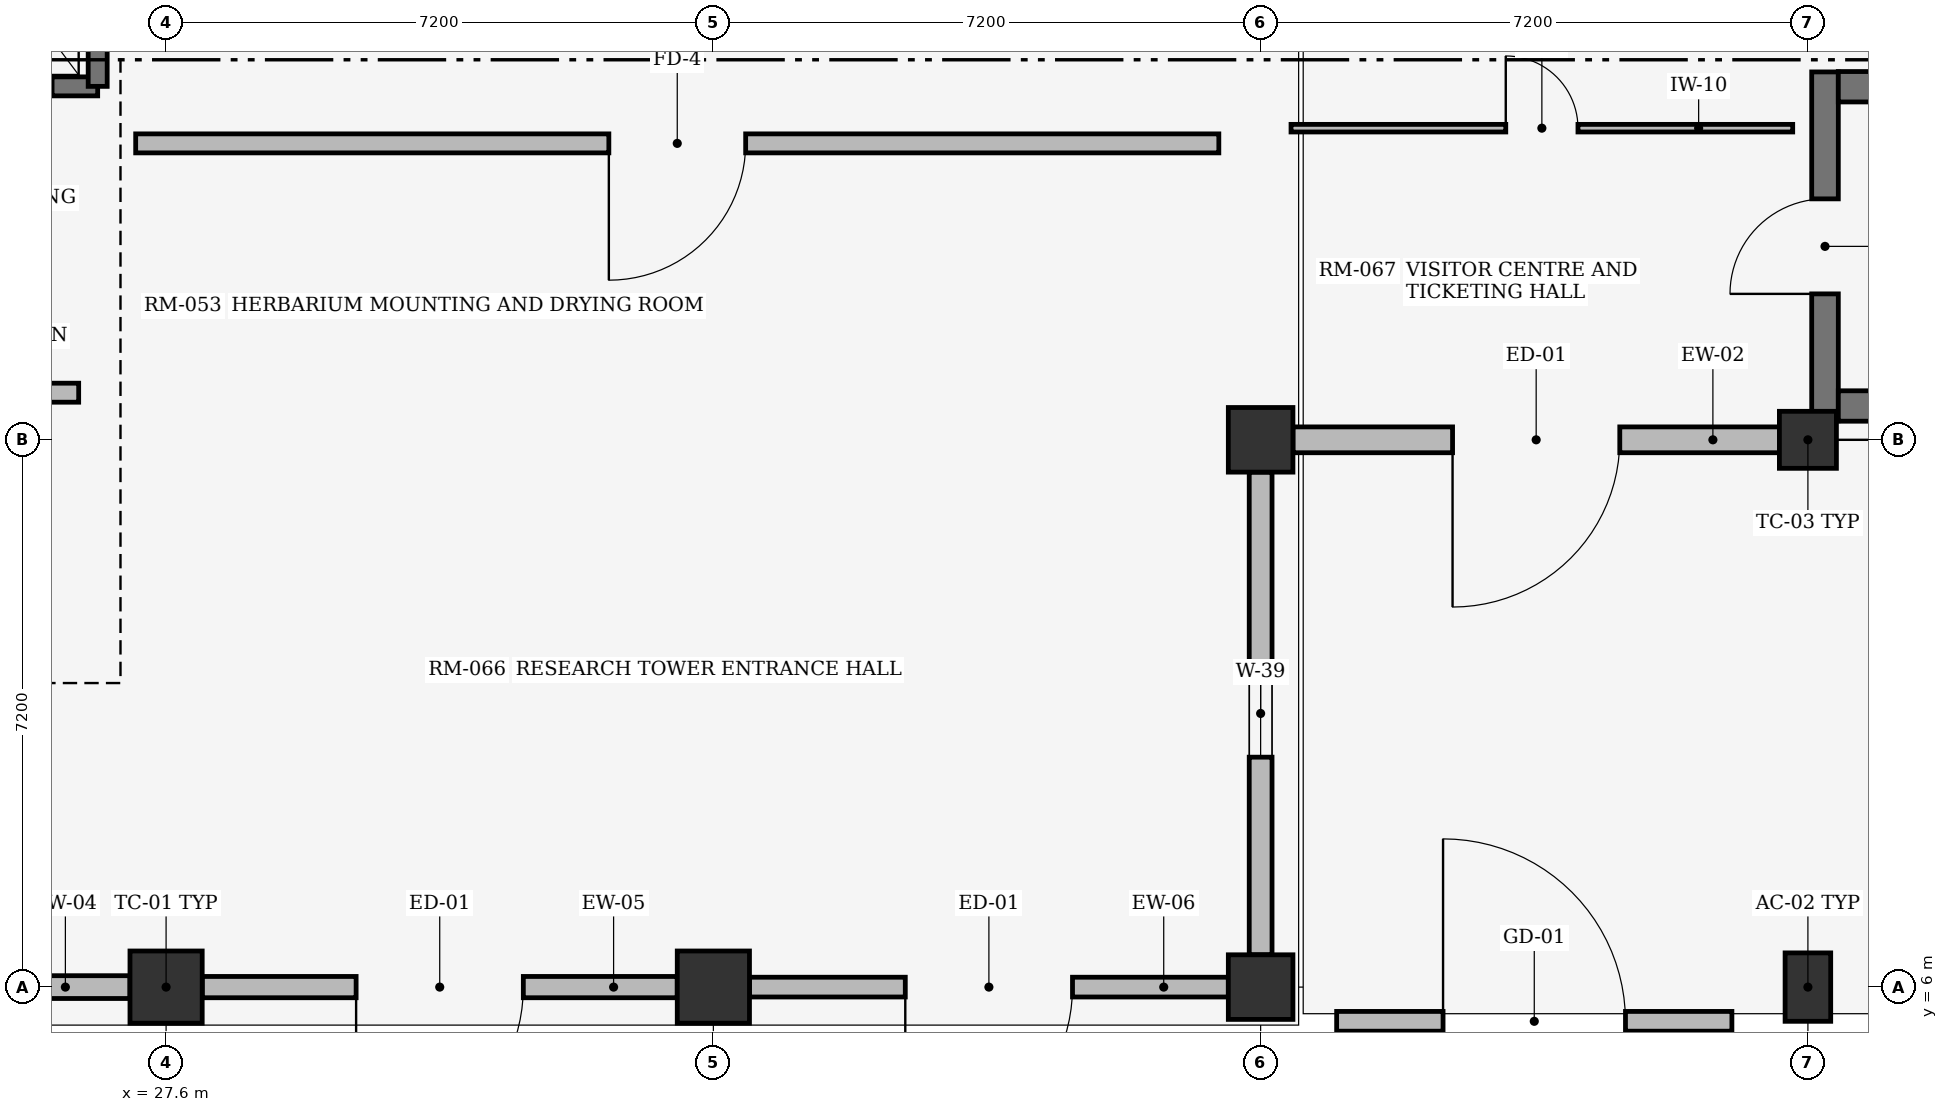
"""IFC4 building model, lengths in metres.
Left out: names, types, materials, properties, quantities, classifications, styles, units other than length and angle.
Written with IfcOpenShell. Run it as: python <this file> out.ifc"""

import sys

from ifc_helpers import new_model, si_unit, direction, frame, frame_2d, origin, origin_2d, place, context, subcontext, project, spatial, rectangle, extrude, element, fill, save


model = new_model("IFC4")
c1 = context("Model", 3, precision=1e-05, world=origin(), true_north=direction((0.0, 1.0)))
c2 = subcontext(c1, "Body", "Model", "MODEL_VIEW")
j1 = project(units=[si_unit("LENGTHUNIT", "METRE"), si_unit("PLANEANGLEUNIT", "RADIAN")], contexts=[c1])
p1 = place(None, origin())
s1 = spatial("IfcSite", under=j1, at=p1, CompositionType="ELEMENT")
p2 = place(p1, origin())
s2 = spatial("IfcBuilding", under=s1, at=p2, CompositionType="ELEMENT")
p3 = place(p2, origin())
s3 = spatial("IfcBuildingStorey", under=s2, at=p3, CompositionType="ELEMENT", Elevation=0.0)
for number, where, z_axis, x_axis in (
    (1, (27.6, 6.0, 0.0), (0.0, 0.0, 1.0), (1.0, 0.0, 0.0)),
    (2, (34.8, 6.0, 0.0), (0.0, 0.0, 1.0), (1.0, 0.0, 0.0)),
):
    element("IfcColumn", number, at=place(p3, frame(where, z_axis=z_axis, x_axis=x_axis)), inside=s3, PredefinedType="COLUMN", context=c2, shape_type="SweptSolid", body=[
        extrude(rectangle(XDim=0.95, YDim=0.95, at=origin_2d()), origin(), (0.0, 0.0, 1.0), 4.48),
    ])
for number, where, z_axis, x_axis in (
    (3, (42.0, 6.0, 0.0), (0.0, 0.0, 1.0), (1.0, 0.0, 0.0)),
    (4, (42.0, 13.2, 0.0), (0.0, 0.0, 1.0), (1.0, 0.0, 0.0)),
):
    element("IfcColumn", number, at=place(p3, frame(where, z_axis=z_axis, x_axis=x_axis)), inside=s3, PredefinedType="COLUMN", context=c2, shape_type="SweptSolid", body=[
        extrude(rectangle(XDim=0.85, YDim=0.85, at=origin_2d()), origin(), (0.0, 0.0, 1.0), 4.48),
    ])
p4 = place(p3, frame((49.2, 6.0, 0.0), z_axis=(0.0, 0.0, 1.0), x_axis=(1.0, 0.0, 0.0)))
e5 = element("IfcColumn", 5, at=p4, inside=s3, PredefinedType="PILASTER", context=c2, shape_type="SweptSolid", body=[
    extrude(rectangle(XDim=0.6, YDim=0.9, at=origin_2d()), origin(), (0.0, 0.0, 1.0), 4.48),
])
p5 = place(p3, frame((49.2, 13.2, 0.0), z_axis=(0.0, 0.0, 1.0), x_axis=(1.0, 0.0, 0.0)))
e6 = element("IfcColumn", 6, at=p5, inside=s3, PredefinedType="COLUMN", context=c2, shape_type="SweptSolid", body=[
    extrude(rectangle(XDim=0.75, YDim=0.75, at=origin_2d()), origin(), (0.0, 0.0, 1.0), 4.48),
])
p6 = place(p3, frame((42.425, 13.2, 0.0), z_axis=(0.0, 0.0, 1.0), x_axis=(1.0, 0.0, 0.0)))
e7 = element("IfcWall", 7, at=p6, inside=s3, PredefinedType="STANDARD", context=c2, shape_type="SweptSolid", body=[
    extrude(rectangle(XDim=6.4, YDim=0.34, at=frame_2d((3.2, 0.0))), origin(), (0.0, 0.0, 1.0), 3.97),
])
p7 = place(p6, frame((2.1, 0.0, 0.0)))
e8 = element("IfcOpeningElement", 8, at=p7, cuts=e7, PredefinedType="OPENING", context=c2, shape_type="SweptSolid", body=[
    extrude(rectangle(XDim=2.2, YDim=2.4, at=frame_2d((1.1, 1.2))), frame((0.0, 0.18, 0.0), z_axis=(0.0, -1.0, 0.0), x_axis=(1.0, 0.0, 0.0)), (0.0, 0.0, 1.0), 0.36),
])
p8 = place(p3, frame((20.825, 6.0, 0.0), z_axis=(0.0, 0.0, 1.0), x_axis=(1.0, 0.0, 0.0)))
e9 = element("IfcWall", 9, at=p8, inside=s3, PredefinedType="STANDARD", context=c2, shape_type="SweptSolid", body=[
    extrude(rectangle(XDim=6.3, YDim=0.3, at=frame_2d((3.15, 0.0))), origin(), (0.0, 0.0, 1.0), 3.66),
])
p9 = place(p8, frame((2.05, 0.0, 0.0)))
e10 = element("IfcOpeningElement", 10, at=p9, cuts=e9, PredefinedType="OPENING", context=c2, shape_type="SweptSolid", body=[
    extrude(rectangle(XDim=2.2, YDim=2.4, at=frame_2d((1.1, 1.2))), frame((0.0, 0.16, 0.0), z_axis=(0.0, -1.0, 0.0), x_axis=(1.0, 0.0, 0.0)), (0.0, 0.0, 1.0), 0.32),
])
p10 = place(p3, frame((28.075, 6.0, 0.0), z_axis=(0.0, 0.0, 1.0), x_axis=(1.0, 0.0, 0.0)))
e11 = element("IfcWall", 11, at=p10, inside=s3, PredefinedType="STANDARD", context=c2, shape_type="SweptSolid", body=[
    extrude(rectangle(XDim=6.25, YDim=0.28, at=frame_2d((3.125, 0.0))), origin(), (0.0, 0.0, 1.0), 3.66),
])
p11 = place(p10, frame((2.025, 0.0, 0.0)))
e12 = element("IfcOpeningElement", 12, at=p11, cuts=e11, PredefinedType="OPENING", context=c2, shape_type="SweptSolid", body=[
    extrude(rectangle(XDim=2.2, YDim=2.4, at=frame_2d((1.1, 1.2))), frame((0.0, 0.15, 0.0), z_axis=(0.0, -1.0, 0.0), x_axis=(1.0, 0.0, 0.0)), (0.0, 0.0, 1.0), 0.3),
])
p12 = place(p3, frame((35.275, 6.0, 0.0), z_axis=(0.0, 0.0, 1.0), x_axis=(1.0, 0.0, 0.0)))
e13 = element("IfcWall", 13, at=p12, inside=s3, PredefinedType="STANDARD", context=c2, shape_type="SweptSolid", body=[
    extrude(rectangle(XDim=6.3, YDim=0.26, at=frame_2d((3.15, 0.0))), origin(), (0.0, 0.0, 1.0), 3.66),
])
p13 = place(p12, frame((2.05, 0.0, 0.0)))
e14 = element("IfcOpeningElement", 14, at=p13, cuts=e13, PredefinedType="OPENING", context=c2, shape_type="SweptSolid", body=[
    extrude(rectangle(XDim=2.2, YDim=2.4, at=frame_2d((1.1, 1.2))), frame((0.0, 0.14, 0.0), z_axis=(0.0, -1.0, 0.0), x_axis=(1.0, 0.0, 0.0)), (0.0, 0.0, 1.0), 0.28),
])
p14 = place(p3, frame((42.0, 6.425, 0.0), z_axis=(0.0, 0.0, 1.0), x_axis=(0.0, 1.0, 0.0)))
e15 = element("IfcWall", 15, at=p14, inside=s3, PredefinedType="STANDARD", context=c2, shape_type="SweptSolid", body=[
    extrude(rectangle(XDim=6.35, YDim=0.3, at=frame_2d((3.175, 0.0))), origin(), (0.0, 0.0, 1.0), 3.66),
])
p15 = place(p14, frame((2.6, 0.0, 0.75)))
e16 = element("IfcOpeningElement", 16, at=p15, cuts=e15, PredefinedType="OPENING", context=c2, shape_type="SweptSolid", body=[
    extrude(rectangle(XDim=1.15, YDim=1.5, at=frame_2d((0.575, 0.75))), frame((0.0, 0.16, 0.0), z_axis=(0.0, -1.0, 0.0), x_axis=(1.0, 0.0, 0.0)), (0.0, 0.0, 1.0), 0.32),
])
p16 = place(p3, frame((43.0, 5.55, 0.0), z_axis=(0.0, 0.0, 1.0), x_axis=(1.0, 0.0, 0.0)))
e17 = element("IfcWall", 17, at=p16, inside=s3, PredefinedType="STANDARD", context=c2, shape_type="SweptSolid", body=[
    extrude(rectangle(XDim=5.2, YDim=0.26, at=frame_2d((2.6, 0.0))), origin(), (0.0, 0.0, 1.0), 2.65),
])
p17 = place(p16, frame((1.4, 0.0, 0.0)))
e18 = element("IfcOpeningElement", 18, at=p17, cuts=e17, PredefinedType="OPENING", context=c2, shape_type="SweptSolid", body=[
    extrude(rectangle(XDim=2.4, YDim=2.2, at=frame_2d((1.2, 1.1))), frame((0.0, 0.14, 0.0), z_axis=(0.0, -1.0, 0.0), x_axis=(1.0, 0.0, 0.0)), (0.0, 0.0, 1.0), 0.28),
])
p18 = place(p3, frame((49.425, 13.45, 0.0), z_axis=(0.0, 0.0, 1.0), x_axis=(0.0, 1.0, 0.0)))
e19 = element("IfcWall", 19, at=p18, inside=s3, PredefinedType="SHEAR", context=c2, shape_type="SweptSolid", body=[
    extrude(rectangle(XDim=4.59, YDim=0.35, at=frame_2d((2.295, 0.0))), origin(), (0.0, 0.0, 1.0), 4.48),
])
p19 = place(p18, frame((1.67, 0.0, 0.0)))
e20 = element("IfcOpeningElement", 20, at=p19, cuts=e19, PredefinedType="OPENING", context=c2, shape_type="SweptSolid", body=[
    extrude(rectangle(XDim=1.25, YDim=2.2, at=frame_2d((0.625, 1.1))), frame((0.0, 0.185, 0.0), z_axis=(0.0, -1.0, 0.0), x_axis=(1.0, 0.0, 0.0)), (0.0, 0.0, 1.0), 0.37),
])
for number, where, z_axis, x_axis in (
    (21, (49.6, 13.645, 0.0), (0.0, 0.0, 1.0), (1.0, 0.0, 0.0)),
    (22, (49.6, 17.845, 0.0), (0.0, 0.0, 1.0), (1.0, 0.0, 0.0)),
):
    element("IfcWall", number, at=place(p3, frame(where, z_axis=z_axis, x_axis=x_axis)), inside=s3, PredefinedType="SHEAR", context=c2, shape_type="SweptSolid", body=[
        extrude(rectangle(XDim=7.98, YDim=0.4, at=frame_2d((3.99, 0.0))), origin(), (0.0, 0.0, 1.0), 4.48),
    ])
p20 = place(p3, frame((24.4, 17.85, 0.0), z_axis=(0.0, 0.0, 1.0), x_axis=(1.0, 0.0, 0.0)))
e23 = element("IfcWall", 23, at=p20, inside=s3, PredefinedType="SHEAR", context=c2, shape_type="SweptSolid", body=[
    extrude(rectangle(XDim=2.3, YDim=0.25, at=frame_2d((1.15, 0.0))), origin(), (0.0, 0.0, 1.0), 4.48),
])
p21 = place(p20, frame((0.6, 0.0, 0.0)))
e24 = element("IfcOpeningElement", 24, at=p21, cuts=e23, PredefinedType="OPENING", context=c2, shape_type="SweptSolid", body=[
    extrude(rectangle(XDim=1.1, YDim=2.2, at=frame_2d((0.55, 1.1))), frame((0.0, 0.135, 0.0), z_axis=(0.0, -1.0, 0.0), x_axis=(1.0, 0.0, 0.0)), (0.0, 0.0, 1.0), 0.27),
])
p22 = place(p3, frame((26.7, 17.85, 0.0), z_axis=(0.0, 0.0, 1.0), x_axis=(0.0, 1.0, 0.0)))
e25 = element("IfcWall", 25, at=p22, inside=s3, PredefinedType="SHEAR", context=c2, shape_type="SweptSolid", body=[
    extrude(rectangle(XDim=2.7, YDim=0.25, at=frame_2d((1.35, 0.0))), origin(), (0.0, 0.0, 1.0), 4.48),
])
p23 = place(p3, frame((24.45, 13.82, 0.0), z_axis=(0.0, 0.0, 1.0), x_axis=(1.0, 0.0, 0.0)))
e26 = element("IfcWall", 26, at=p23, inside=s3, PredefinedType="SOLIDWALL", context=c2, shape_type="SweptSolid", body=[
    extrude(rectangle(XDim=2.0, YDim=0.25, at=frame_2d((1.0, 0.0))), origin(), (0.0, 0.0, 1.0), 4.46),
])
p24 = place(p3, frame((42.4, 17.3, 0.0), z_axis=(0.0, 0.0, 1.0), x_axis=(1.0, 0.0, 0.0)))
e27 = element("IfcWall", 27, at=p24, inside=s3, PredefinedType="PARTITIONING", context=c2, shape_type="SweptSolid", body=[
    extrude(rectangle(XDim=6.6, YDim=0.1, at=frame_2d((3.3, 0.0))), origin(), (0.0, 0.0, 1.0), 4.46),
])
p25 = place(p24, frame((2.825, 0.0, 0.0)))
e28 = element("IfcOpeningElement", 28, at=p25, cuts=e27, PredefinedType="OPENING", context=c2, shape_type="SweptSolid", body=[
    extrude(rectangle(XDim=0.95, YDim=2.15, at=frame_2d((0.475, 1.075))), frame((0.0, 0.06, 0.0), z_axis=(0.0, -1.0, 0.0), x_axis=(1.0, 0.0, 0.0)), (0.0, 0.0, 1.0), 0.12),
])
p26 = place(p3, frame((27.2, 17.1, 0.0), z_axis=(0.0, 0.0, 1.0), x_axis=(1.0, 0.0, 0.0)))
e29 = element("IfcWall", 29, at=p26, inside=s3, PredefinedType="SOLIDWALL", context=c2, shape_type="SweptSolid", body=[
    extrude(rectangle(XDim=14.25, YDim=0.25, at=frame_2d((7.125, 0.0))), origin(), (0.0, 0.0, 1.0), 4.46),
])
p27 = place(p26, frame((6.225, 0.0, 0.0)))
e30 = element("IfcOpeningElement", 30, at=p27, cuts=e29, PredefinedType="OPENING", context=c2, shape_type="SweptSolid", body=[
    extrude(rectangle(XDim=1.8, YDim=2.25, at=frame_2d((0.9, 1.125))), frame((0.0, 0.135, 0.0), z_axis=(0.0, -1.0, 0.0), x_axis=(1.0, 0.0, 0.0)), (0.0, 0.0, 1.0), 0.27),
])
p28 = place(p7, frame((2.2, 0.0, 0.0), z_axis=(0.0, 0.0, 1.0), x_axis=(-1.0, 0.0, 0.0)))
e31 = element("IfcDoor", 31, at=p28, inside=s3, OperationType="DOUBLE_DOOR_SINGLE_SWING", PredefinedType="DOOR", context=c2, shape_type="SweptSolid", body=[
    extrude(rectangle(XDim=2.2, YDim=2.4, at=frame_2d((1.1, 1.2))), frame((0.0, 0.025, 0.0), z_axis=(0.0, -1.0, 0.0), x_axis=(1.0, 0.0, 0.0)), (0.0, 0.0, 1.0), 0.05),
])
fill(e8, e31)
p29 = place(p11, frame((2.2, 0.0, 0.0), z_axis=(0.0, 0.0, 1.0), x_axis=(-1.0, 0.0, 0.0)))
e32 = element("IfcDoor", 32, at=p29, inside=s3, OperationType="DOUBLE_DOOR_SINGLE_SWING", PredefinedType="DOOR", context=c2, shape_type="SweptSolid", body=[
    extrude(rectangle(XDim=2.2, YDim=2.4, at=frame_2d((1.1, 1.2))), frame((0.0, 0.025, 0.0), z_axis=(0.0, -1.0, 0.0), x_axis=(1.0, 0.0, 0.0)), (0.0, 0.0, 1.0), 0.05),
])
fill(e12, e32)
p30 = place(p13, frame((2.2, 0.0, 0.0), z_axis=(0.0, 0.0, 1.0), x_axis=(-1.0, 0.0, 0.0)))
e33 = element("IfcDoor", 33, at=p30, inside=s3, OperationType="DOUBLE_DOOR_SINGLE_SWING", PredefinedType="DOOR", context=c2, shape_type="SweptSolid", body=[
    extrude(rectangle(XDim=2.2, YDim=2.4, at=frame_2d((1.1, 1.2))), frame((0.0, 0.025, 0.0), z_axis=(0.0, -1.0, 0.0), x_axis=(1.0, 0.0, 0.0)), (0.0, 0.0, 1.0), 0.05),
])
fill(e14, e33)
p31 = place(p15, origin())
e34 = element("IfcWindow", 34, at=p31, inside=s3, PartitioningType="SINGLE_PANEL", PredefinedType="WINDOW", context=c2, shape_type="SweptSolid", body=[
    extrude(rectangle(XDim=1.15, YDim=1.5, at=frame_2d((0.575, 0.75))), frame((0.0, 0.03, 0.0), z_axis=(0.0, -1.0, 0.0), x_axis=(1.0, 0.0, 0.0)), (0.0, 0.0, 1.0), 0.06),
])
fill(e16, e34)
p32 = place(p17, origin())
e35 = element("IfcDoor", 35, at=p32, inside=s3, OperationType="DOUBLE_DOOR_SINGLE_SWING", PredefinedType="GATE", context=c2, shape_type="SweptSolid", body=[
    extrude(rectangle(XDim=2.4, YDim=2.2, at=frame_2d((1.2, 1.1))), frame((0.0, 0.025, 0.0), z_axis=(0.0, -1.0, 0.0), x_axis=(1.0, 0.0, 0.0)), (0.0, 0.0, 1.0), 0.05),
])
fill(e18, e35)
p33 = place(p19, origin())
e36 = element("IfcDoor", 36, at=p33, inside=s3, OperationType="SINGLE_SWING_LEFT", PredefinedType="DOOR", context=c2, shape_type="SweptSolid", body=[
    extrude(rectangle(XDim=1.25, YDim=2.2, at=frame_2d((0.625, 1.1))), frame((0.0, 0.025, 0.0), z_axis=(0.0, -1.0, 0.0), x_axis=(1.0, 0.0, 0.0)), (0.0, 0.0, 1.0), 0.05),
])
fill(e20, e36)
p34 = place(p25, origin())
e37 = element("IfcDoor", 37, at=p34, inside=s3, OperationType="SINGLE_SWING_LEFT", PredefinedType="DOOR", context=c2, shape_type="SweptSolid", body=[
    extrude(rectangle(XDim=0.95, YDim=2.15, at=frame_2d((0.475, 1.075))), frame((0.0, 0.025, 0.0), z_axis=(0.0, -1.0, 0.0), x_axis=(1.0, 0.0, 0.0)), (0.0, 0.0, 1.0), 0.05),
])
fill(e28, e37)
p35 = place(p27, frame((1.8, 0.0, 0.0), z_axis=(0.0, 0.0, 1.0), x_axis=(-1.0, 0.0, 0.0)))
e38 = element("IfcDoor", 38, at=p35, inside=s3, OperationType="DOUBLE_DOOR_SINGLE_SWING", PredefinedType="DOOR", context=c2, shape_type="SweptSolid", body=[
    extrude(rectangle(XDim=1.8, YDim=2.25, at=frame_2d((0.9, 1.125))), frame((0.0, 0.025, 0.0), z_axis=(0.0, -1.0, 0.0), x_axis=(1.0, 0.0, 0.0)), (0.0, 0.0, 1.0), 0.05),
])
fill(e30, e38)
save(model, sys.argv[1])
